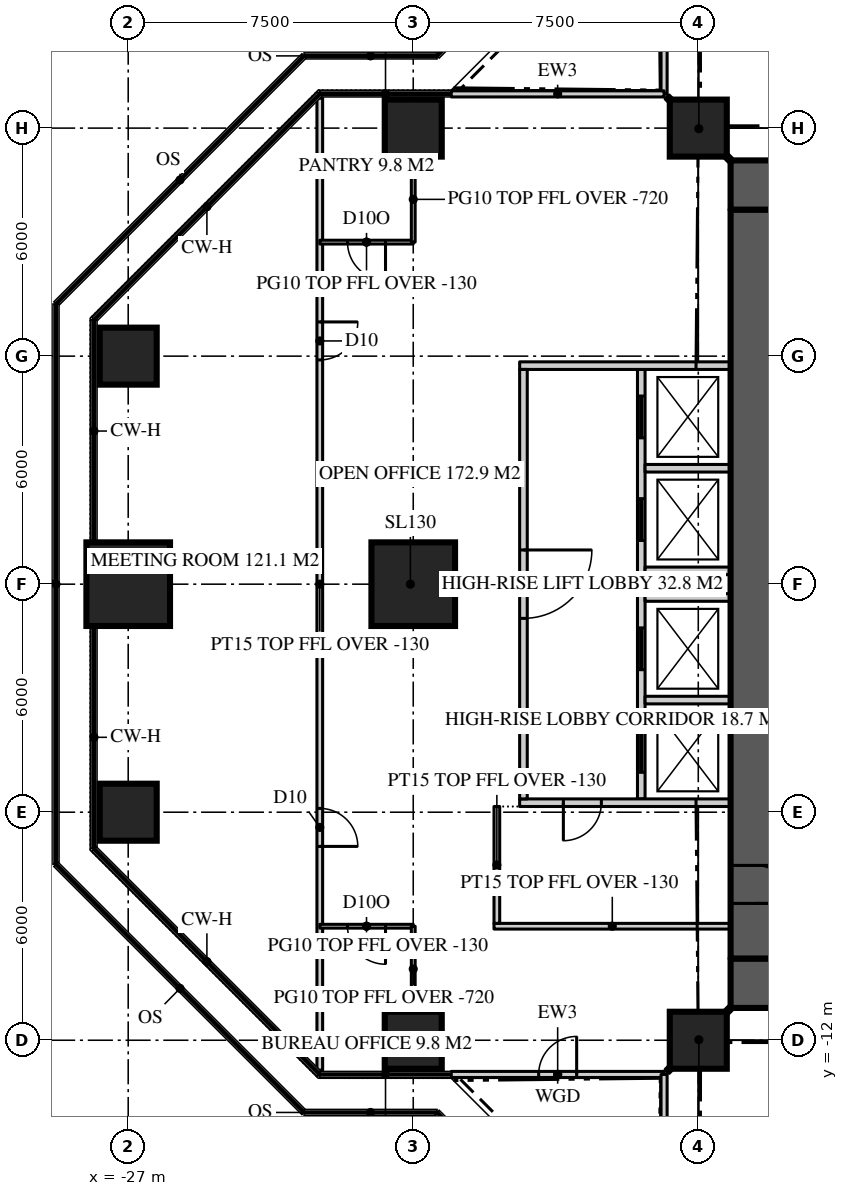
"""IFC4 building model, lengths in metres.
Left out: names, types, materials, properties, quantities, classifications, styles, units other than length and angle.
Written with IfcOpenShell. Run it as: python <this file> out.ifc"""

import sys

from ifc_helpers import new_model, si_unit, direction, frame, frame_2d, origin, origin_2d, place, context, subcontext, project, spatial, rectangle, extrude, element, fill, save


model = new_model("IFC4")
c1 = context("Model", 3, precision=1e-05, world=origin(), true_north=direction((0.0, 1.0)))
c2 = subcontext(c1, "Body", "Model", "MODEL_VIEW")
j1 = project(units=[si_unit("LENGTHUNIT", "METRE"), si_unit("PLANEANGLEUNIT", "RADIAN")], contexts=[c1])
p1 = place(None, origin())
s1 = spatial("IfcSite", under=j1, at=p1, CompositionType="ELEMENT")
p2 = place(p1, origin())
s2 = spatial("IfcBuilding", under=s1, at=p2, CompositionType="ELEMENT")
p3 = place(p2, frame((0.0, 0.0, 240.0)))
s3 = spatial("IfcBuildingStorey", under=s2, at=p3, CompositionType="ELEMENT", Elevation=240.0)
p4 = place(p3, frame((-11.15, 10.5, 0.0), z_axis=(0.0, 0.0, 1.0), x_axis=(1.0, 0.0, 0.0)))
e1 = element("IfcWall", 1, at=p4, inside=s3, PredefinedType="SHEAR", context=c2, shape_type="SweptSolid", body=[
    extrude(rectangle(XDim=22.3, YDim=1.3, at=frame_2d((11.15, 0.0))), origin(), (0.0, 0.0, 1.0), 3.9),
])
p5 = place(p4, frame((4.25, 0.0, 0.0)))
e2 = element("IfcOpeningElement", 2, at=p5, cuts=e1, PredefinedType="OPENING", context=c2, shape_type="SweptSolid", body=[
    extrude(rectangle(XDim=1.8, YDim=2.2, at=frame_2d((0.9, 1.1))), frame((0.0, 0.66, 0.0), z_axis=(0.0, -1.0, 0.0), x_axis=(1.0, 0.0, 0.0)), (0.0, 0.0, 1.0), 1.32),
])
p6 = place(p4, frame((16.25, 0.0, 0.0)))
e3 = element("IfcOpeningElement", 3, at=p6, cuts=e1, PredefinedType="OPENING", context=c2, shape_type="SweptSolid", body=[
    extrude(rectangle(XDim=1.8, YDim=2.2, at=frame_2d((0.9, 1.1))), frame((0.0, 0.66, 0.0), z_axis=(0.0, -1.0, 0.0), x_axis=(1.0, 0.0, 0.0)), (0.0, 0.0, 1.0), 1.32),
])
p7 = place(p3, frame((11.15, -10.5, 0.0), z_axis=(0.0, 0.0, 1.0), x_axis=(-1.0, 0.0, 0.0)))
e4 = element("IfcWall", 4, at=p7, inside=s3, PredefinedType="SHEAR", context=c2, shape_type="SweptSolid", body=[
    extrude(rectangle(XDim=22.3, YDim=1.3, at=frame_2d((11.15, 0.0))), origin(), (0.0, 0.0, 1.0), 3.9),
])
p8 = place(p7, frame((16.25, 0.0, 0.0)))
e5 = element("IfcOpeningElement", 5, at=p8, cuts=e4, PredefinedType="OPENING", context=c2, shape_type="SweptSolid", body=[
    extrude(rectangle(XDim=1.8, YDim=2.2, at=frame_2d((0.9, 1.1))), frame((0.0, 0.66, 0.0), z_axis=(0.0, -1.0, 0.0), x_axis=(1.0, 0.0, 0.0)), (0.0, 0.0, 1.0), 1.32),
])
p9 = place(p7, frame((4.25, 0.0, 0.0)))
e6 = element("IfcOpeningElement", 6, at=p9, cuts=e4, PredefinedType="OPENING", context=c2, shape_type="SweptSolid", body=[
    extrude(rectangle(XDim=1.8, YDim=2.2, at=frame_2d((0.9, 1.1))), frame((0.0, 0.66, 0.0), z_axis=(0.0, -1.0, 0.0), x_axis=(1.0, 0.0, 0.0)), (0.0, 0.0, 1.0), 1.32),
])
p10 = place(p3, frame((-10.5, 9.85, 0.0), z_axis=(0.0, 0.0, 1.0), x_axis=(0.0, -1.0, 0.0)))
e7 = element("IfcWall", 7, at=p10, inside=s3, PredefinedType="SHEAR", context=c2, shape_type="SweptSolid", body=[
    extrude(rectangle(XDim=19.7, YDim=1.3, at=frame_2d((9.85, 0.0))), origin(), (0.0, 0.0, 1.0), 3.9),
])
p11 = place(p10, frame((17.25, 0.0, 0.0)))
e8 = element("IfcOpeningElement", 8, at=p11, cuts=e7, PredefinedType="OPENING", context=c2, shape_type="SweptSolid", body=[
    extrude(rectangle(XDim=1.0, YDim=2.2, at=frame_2d((0.5, 1.1))), frame((0.0, 0.66, 0.0), z_axis=(0.0, -1.0, 0.0), x_axis=(1.0, 0.0, 0.0)), (0.0, 0.0, 1.0), 1.32),
])
for number, where, z_axis, x_axis in (
    (9, (-19.5, -12.0, 0.0), (0.0, 0.0, 1.0), (1.0, 0.0, 0.0)),
    (10, (-12.0, -12.0, 0.0), (0.0, 0.0, 1.0), (1.0, 0.0, 0.0)),
    (11, (-27.0, -6.0, 0.0), (0.0, 0.0, 1.0), (1.0, 0.0, 0.0)),
):
    element("IfcColumn", number, at=place(p3, frame(where, z_axis=z_axis, x_axis=x_axis)), inside=s3, PredefinedType="COLUMN", context=c2, shape_type="SweptSolid", body=[
        extrude(rectangle(XDim=1.5, YDim=1.5, at=origin_2d()), origin(), (0.0, 0.0, 1.0), 3.9),
    ])
for number, where, z_axis, x_axis in (
    (12, (-27.0, 0.0, 0.0), (0.0, 0.0, 1.0), (1.0, 0.0, 0.0)),
    (13, (-19.5, 0.0, 0.0), (0.0, 0.0, 1.0), (1.0, 0.0, 0.0)),
):
    element("IfcColumn", number, at=place(p3, frame(where, z_axis=z_axis, x_axis=x_axis)), inside=s3, PredefinedType="COLUMN", context=c2, shape_type="SweptSolid", body=[
        extrude(rectangle(XDim=2.2, YDim=2.2, at=origin_2d()), origin(), (0.0, 0.0, 1.0), 3.9),
    ])
for number, where, z_axis, x_axis in (
    (14, (-27.0, 6.0, 0.0), (0.0, 0.0, 1.0), (1.0, 0.0, 0.0)),
    (15, (-19.5, 12.0, 0.0), (0.0, 0.0, 1.0), (1.0, 0.0, 0.0)),
    (16, (-12.0, 12.0, 0.0), (0.0, 0.0, 1.0), (1.0, 0.0, 0.0)),
):
    element("IfcColumn", number, at=place(p3, frame(where, z_axis=z_axis, x_axis=x_axis)), inside=s3, PredefinedType="COLUMN", context=c2, shape_type="SweptSolid", body=[
        extrude(rectangle(XDim=1.5, YDim=1.5, at=origin_2d()), origin(), (0.0, 0.0, 1.0), 3.9),
    ])
p12 = place(p3, frame((-12.9, 18.5, 0.0), z_axis=(0.0, 0.0, 1.0), x_axis=(0.0, -1.0, 0.0)))
e17 = element("IfcWall", 17, at=p12, inside=s3, PredefinedType="SOLIDWALL", context=c2, shape_type="SweptSolid", body=[
    extrude(rectangle(XDim=5.6, YDim=0.16, at=frame_2d((2.8, 0.0))), origin(), (0.0, 0.0, 1.0), 3.77),
])
p13 = place(p12, frame((2.3, 0.0, 0.0)))
e18 = element("IfcOpeningElement", 18, at=p13, cuts=e17, PredefinedType="OPENING", context=c2, shape_type="SweptSolid", body=[
    extrude(rectangle(XDim=1.0, YDim=2.2, at=frame_2d((0.5, 1.1))), frame((0.0, 0.09, 0.0), z_axis=(0.0, -1.0, 0.0), x_axis=(1.0, 0.0, 0.0)), (0.0, 0.0, 1.0), 0.18),
])
p14 = place(p3, frame((-12.9, 12.9, 0.0), z_axis=(0.0, 0.0, 1.0), x_axis=(-1.0, 0.0, 0.0)))
e19 = element("IfcWall", 19, at=p14, inside=s3, PredefinedType="SOLIDWALL", context=c2, shape_type="SweptSolid", body=[
    extrude(rectangle(XDim=5.6, YDim=0.16, at=frame_2d((2.8, 0.0))), origin(), (0.0, 0.0, 1.0), 3.77),
])
p15 = place(p3, frame((-18.5, -12.9, 0.0), z_axis=(0.0, 0.0, 1.0), x_axis=(1.0, 0.0, 0.0)))
e20 = element("IfcWall", 20, at=p15, inside=s3, PredefinedType="SOLIDWALL", context=c2, shape_type="SweptSolid", body=[
    extrude(rectangle(XDim=5.6, YDim=0.16, at=frame_2d((2.8, 0.0))), origin(), (0.0, 0.0, 1.0), 3.77),
])
p16 = place(p15, frame((2.3, 0.0, 0.0)))
e21 = element("IfcOpeningElement", 21, at=p16, cuts=e20, PredefinedType="OPENING", context=c2, shape_type="SweptSolid", body=[
    extrude(rectangle(XDim=1.0, YDim=2.2, at=frame_2d((0.5, 1.1))), frame((0.0, 0.09, 0.0), z_axis=(0.0, -1.0, 0.0), x_axis=(1.0, 0.0, 0.0)), (0.0, 0.0, 1.0), 0.18),
])
p17 = place(p3, frame((-12.9, -12.9, 0.0), z_axis=(0.0, 0.0, 1.0), x_axis=(0.0, -1.0, 0.0)))
e22 = element("IfcWall", 22, at=p17, inside=s3, PredefinedType="SOLIDWALL", context=c2, shape_type="SweptSolid", body=[
    extrude(rectangle(XDim=5.6, YDim=0.16, at=frame_2d((2.8, 0.0))), origin(), (0.0, 0.0, 1.0), 3.77),
])
p18 = place(p3, frame((-21.959, 12.786, 0.0), z_axis=(0.0, 0.0, 1.0), x_axis=(0.0, -1.0, 0.0)))
e23 = element("IfcWall", 23, at=p18, inside=s3, PredefinedType="PARTITIONING", context=c2, shape_type="SweptSolid", body=[
    extrude(rectangle(XDim=25.573, YDim=0.15, at=frame_2d((12.786, 0.0))), origin(), (0.0, 0.0, 1.0), 3.77),
])
p19 = place(p18, frame((18.687, 0.0, 0.0)))
e24 = element("IfcOpeningElement", 24, at=p19, cuts=e23, PredefinedType="OPENING", context=c2, shape_type="SweptSolid", body=[
    extrude(rectangle(XDim=1.0, YDim=2.2, at=frame_2d((0.5, 1.1))), frame((0.0, 0.085, 0.0), z_axis=(0.0, -1.0, 0.0), x_axis=(1.0, 0.0, 0.0)), (0.0, 0.0, 1.0), 0.17),
])
p20 = place(p18, frame((5.886, 0.0, 0.0)))
e25 = element("IfcOpeningElement", 25, at=p20, cuts=e23, PredefinedType="OPENING", context=c2, shape_type="SweptSolid", body=[
    extrude(rectangle(XDim=1.0, YDim=2.2, at=frame_2d((0.5, 1.1))), frame((0.0, 0.085, 0.0), z_axis=(0.0, -1.0, 0.0), x_axis=(1.0, 0.0, 0.0)), (0.0, 0.0, 1.0), 0.17),
])
p21 = place(p3, frame((-19.5, -9.0, 0.0), z_axis=(0.0, 0.0, 1.0), x_axis=(-1.0, 0.0, 0.0)))
e26 = element("IfcWall", 26, at=p21, inside=s3, PredefinedType="PARTITIONING", context=c2, shape_type="SweptSolid", body=[
    extrude(rectangle(XDim=2.459, YDim=0.1, at=frame_2d((1.229, 0.0))), origin(), (0.0, 0.0, 1.0), 3.77),
])
p22 = place(p21, frame((0.729, 0.0, 0.0)))
e27 = element("IfcOpeningElement", 27, at=p22, cuts=e26, PredefinedType="OPENING", context=c2, shape_type="SweptSolid", body=[
    extrude(rectangle(XDim=1.0, YDim=2.2, at=frame_2d((0.5, 1.1))), frame((0.0, 0.06, 0.0), z_axis=(0.0, -1.0, 0.0), x_axis=(1.0, 0.0, 0.0)), (0.0, 0.0, 1.0), 0.12),
])
p23 = place(p3, frame((-19.5, -9.0, 0.0), z_axis=(0.0, 0.0, 1.0), x_axis=(0.0, -1.0, 0.0)))
e28 = element("IfcWall", 28, at=p23, inside=s3, PredefinedType="PARTITIONING", context=c2, shape_type="SweptSolid", body=[
    extrude(rectangle(XDim=2.25, YDim=0.1, at=frame_2d((1.125, 0.0))), origin(), (0.0, 0.0, 1.0), 3.18),
])
p24 = place(p3, frame((-19.5, 9.0, 0.0), z_axis=(0.0, 0.0, 1.0), x_axis=(-1.0, 0.0, 0.0)))
e29 = element("IfcWall", 29, at=p24, inside=s3, PredefinedType="PARTITIONING", context=c2, shape_type="SweptSolid", body=[
    extrude(rectangle(XDim=2.459, YDim=0.1, at=frame_2d((1.229, 0.0))), origin(), (0.0, 0.0, 1.0), 3.77),
])
p25 = place(p24, frame((0.729, 0.0, 0.0)))
e30 = element("IfcOpeningElement", 30, at=p25, cuts=e29, PredefinedType="OPENING", context=c2, shape_type="SweptSolid", body=[
    extrude(rectangle(XDim=1.0, YDim=2.2, at=frame_2d((0.5, 1.1))), frame((0.0, 0.06, 0.0), z_axis=(0.0, -1.0, 0.0), x_axis=(1.0, 0.0, 0.0)), (0.0, 0.0, 1.0), 0.12),
])
p26 = place(p3, frame((-19.5, 9.0, 0.0), z_axis=(0.0, 0.0, 1.0), x_axis=(0.0, 1.0, 0.0)))
e31 = element("IfcWall", 31, at=p26, inside=s3, PredefinedType="PARTITIONING", context=c2, shape_type="SweptSolid", body=[
    extrude(rectangle(XDim=2.25, YDim=0.1, at=frame_2d((1.125, 0.0))), origin(), (0.0, 0.0, 1.0), 3.18),
])
p27 = place(p3, frame((-13.5, 5.65, 0.0), z_axis=(0.0, 0.0, 1.0), x_axis=(0.0, -1.0, 0.0)))
e32 = element("IfcWall", 32, at=p27, inside=s3, PredefinedType="SOLIDWALL", context=c2, shape_type="SweptSolid", body=[
    extrude(rectangle(XDim=11.3, YDim=0.2, at=frame_2d((5.65, 0.0))), origin(), (0.0, 0.0, 1.0), 3.7),
])
p28 = place(p27, frame((0.7, 0.0, 0.0)))
e33 = element("IfcOpeningElement", 33, at=p28, cuts=e32, PredefinedType="OPENING", context=c2, shape_type="SweptSolid", body=[
    extrude(rectangle(XDim=1.1, YDim=2.2, at=frame_2d((0.55, 1.1))), frame((0.0, 0.11, 0.0), z_axis=(0.0, -1.0, 0.0), x_axis=(1.0, 0.0, 0.0)), (0.0, 0.0, 1.0), 0.22),
])
p29 = place(p27, frame((3.4, 0.0, 0.0)))
e34 = element("IfcOpeningElement", 34, at=p29, cuts=e32, PredefinedType="OPENING", context=c2, shape_type="SweptSolid", body=[
    extrude(rectangle(XDim=1.1, YDim=2.2, at=frame_2d((0.55, 1.1))), frame((0.0, 0.11, 0.0), z_axis=(0.0, -1.0, 0.0), x_axis=(1.0, 0.0, 0.0)), (0.0, 0.0, 1.0), 0.22),
])
p30 = place(p27, frame((6.8, 0.0, 0.0)))
e35 = element("IfcOpeningElement", 35, at=p30, cuts=e32, PredefinedType="OPENING", context=c2, shape_type="SweptSolid", body=[
    extrude(rectangle(XDim=1.1, YDim=2.2, at=frame_2d((0.55, 1.1))), frame((0.0, 0.11, 0.0), z_axis=(0.0, -1.0, 0.0), x_axis=(1.0, 0.0, 0.0)), (0.0, 0.0, 1.0), 0.22),
])
p31 = place(p27, frame((9.5, 0.0, 0.0)))
e36 = element("IfcOpeningElement", 36, at=p31, cuts=e32, PredefinedType="OPENING", context=c2, shape_type="SweptSolid", body=[
    extrude(rectangle(XDim=1.1, YDim=2.2, at=frame_2d((0.55, 1.1))), frame((0.0, 0.11, 0.0), z_axis=(0.0, -1.0, 0.0), x_axis=(1.0, 0.0, 0.0)), (0.0, 0.0, 1.0), 0.22),
])
p32 = place(p3, frame((-11.15, 5.75, 0.0), z_axis=(0.0, 0.0, 1.0), x_axis=(-1.0, 0.0, 0.0)))
e37 = element("IfcWall", 37, at=p32, inside=s3, PredefinedType="SOLIDWALL", context=c2, shape_type="SweptSolid", body=[
    extrude(rectangle(XDim=5.55, YDim=0.2, at=frame_2d((2.775, 0.0))), origin(), (0.0, 0.0, 1.0), 3.7),
])
p33 = place(p3, frame((-11.15, -5.75, 0.0), z_axis=(0.0, 0.0, 1.0), x_axis=(-1.0, 0.0, 0.0)))
e38 = element("IfcWall", 38, at=p33, inside=s3, PredefinedType="SOLIDWALL", context=c2, shape_type="SweptSolid", body=[
    extrude(rectangle(XDim=5.55, YDim=0.2, at=frame_2d((2.775, 0.0))), origin(), (0.0, 0.0, 1.0), 3.7),
])
p34 = place(p33, frame((3.4, 0.0, 0.0)))
e39 = element("IfcOpeningElement", 39, at=p34, cuts=e38, PredefinedType="OPENING", context=c2, shape_type="SweptSolid", body=[
    extrude(rectangle(XDim=1.0, YDim=2.2, at=frame_2d((0.5, 1.1))), frame((0.0, 0.11, 0.0), z_axis=(0.0, -1.0, 0.0), x_axis=(1.0, 0.0, 0.0)), (0.0, 0.0, 1.0), 0.22),
])
for number, where, z_axis, x_axis in (
    (40, (-11.15, 3.05, 0.0), (0.0, 0.0, 1.0), (-1.0, 0.0, 0.0)),
    (41, (-11.15, 0.35, 0.0), (0.0, 0.0, 1.0), (-1.0, 0.0, 0.0)),
    (42, (-11.15, -0.35, 0.0), (0.0, 0.0, 1.0), (-1.0, 0.0, 0.0)),
    (43, (-11.15, -3.05, 0.0), (0.0, 0.0, 1.0), (-1.0, 0.0, 0.0)),
):
    element("IfcWall", number, at=place(p3, frame(where, z_axis=z_axis, x_axis=x_axis)), inside=s3, PredefinedType="SOLIDWALL", context=c2, shape_type="SweptSolid", body=[
        extrude(rectangle(XDim=2.25, YDim=0.2, at=frame_2d((1.125, 0.0))), origin(), (0.0, 0.0, 1.0), 3.7),
    ])
p35 = place(p3, frame((-16.6, 5.65, 0.0), z_axis=(0.0, 0.0, 1.0), x_axis=(0.0, -1.0, 0.0)))
e44 = element("IfcWall", 44, at=p35, inside=s3, PredefinedType="SOLIDWALL", context=c2, shape_type="SweptSolid", body=[
    extrude(rectangle(XDim=11.3, YDim=0.2, at=frame_2d((5.65, 0.0))), origin(), (0.0, 0.0, 1.0), 3.18),
])
p36 = place(p35, frame((4.75, 0.0, 0.0)))
e45 = element("IfcOpeningElement", 45, at=p36, cuts=e44, PredefinedType="OPENING", context=c2, shape_type="SweptSolid", body=[
    extrude(rectangle(XDim=1.8, YDim=2.2, at=frame_2d((0.9, 1.1))), frame((0.0, 0.11, 0.0), z_axis=(0.0, -1.0, 0.0), x_axis=(1.0, 0.0, 0.0)), (0.0, 0.0, 1.0), 0.22),
])
for number, where, z_axis, x_axis in (
    (46, (-11.15, 11.15, 0.0), (0.0, 0.0, 1.0), (-0.707, 0.707, 0.0)),
    (47, (-11.15, -11.15, 0.0), (0.0, 0.0, 1.0), (-0.707, -0.707, 0.0)),
):
    element("IfcWall", number, at=place(p3, frame(where, z_axis=z_axis, x_axis=x_axis)), inside=s3, PredefinedType="PARTITIONING", context=c2, shape_type="SweptSolid", body=[
        extrude(rectangle(XDim=2.362, YDim=0.15, at=frame_2d((1.181, 0.0))), origin(), (0.0, 0.0, 1.0), 3.22),
    ])
p37 = place(p3, frame((-11.15, -9.0, 0.0), z_axis=(0.0, 0.0, 1.0), x_axis=(-1.0, 0.0, 0.0)))
e48 = element("IfcWall", 48, at=p37, inside=s3, PredefinedType="PARTITIONING", context=c2, shape_type="SweptSolid", body=[
    extrude(rectangle(XDim=6.225, YDim=0.15, at=frame_2d((3.113, 0.0))), origin(), (0.0, 0.0, 1.0), 3.77),
])
p38 = place(p3, frame((-17.3, -5.85, 0.0), z_axis=(0.0, 0.0, 1.0), x_axis=(0.0, -1.0, 0.0)))
e49 = element("IfcWall", 49, at=p38, inside=s3, PredefinedType="PARTITIONING", context=c2, shape_type="SweptSolid", body=[
    extrude(rectangle(XDim=3.075, YDim=0.15, at=frame_2d((1.538, 0.0))), origin(), (0.0, 0.0, 1.0), 3.77),
])
p39 = place(p16, origin())
e50 = element("IfcDoor", 50, at=p39, inside=s3, OperationType="SINGLE_SWING_RIGHT", PredefinedType="DOOR", context=c2, shape_type="SweptSolid", body=[
    extrude(rectangle(XDim=1.0, YDim=2.2, at=frame_2d((0.5, 1.1))), frame((0.0, 0.025, 0.0), z_axis=(0.0, -1.0, 0.0), x_axis=(1.0, 0.0, 0.0)), (0.0, 0.0, 1.0), 0.05),
])
fill(e21, e50)
p40 = place(p11, origin())
e51 = element("IfcDoor", 51, at=p40, inside=s3, OperationType="SINGLE_SWING_RIGHT", PredefinedType="DOOR", context=c2, shape_type="SweptSolid", body=[
    extrude(rectangle(XDim=1.0, YDim=2.2, at=frame_2d((0.5, 1.1))), frame((0.0, 0.025, 0.0), z_axis=(0.0, -1.0, 0.0), x_axis=(1.0, 0.0, 0.0)), (0.0, 0.0, 1.0), 0.05),
])
fill(e8, e51)
p41 = place(p19, origin())
e52 = element("IfcDoor", 52, at=p41, inside=s3, OperationType="SINGLE_SWING_RIGHT", PredefinedType="DOOR", context=c2, shape_type="SweptSolid", body=[
    extrude(rectangle(XDim=1.0, YDim=2.2, at=frame_2d((0.5, 1.1))), frame((0.0, 0.025, 0.0), z_axis=(0.0, -1.0, 0.0), x_axis=(1.0, 0.0, 0.0)), (0.0, 0.0, 1.0), 0.05),
])
fill(e24, e52)
p42 = place(p20, origin())
e53 = element("IfcDoor", 53, at=p42, inside=s3, OperationType="SINGLE_SWING_LEFT", PredefinedType="DOOR", context=c2, shape_type="SweptSolid", body=[
    extrude(rectangle(XDim=1.0, YDim=2.2, at=frame_2d((0.5, 1.1))), frame((0.0, 0.025, 0.0), z_axis=(0.0, -1.0, 0.0), x_axis=(1.0, 0.0, 0.0)), (0.0, 0.0, 1.0), 0.05),
])
fill(e25, e53)
p43 = place(p22, origin())
e54 = element("IfcDoor", 54, at=p43, inside=s3, OperationType="SINGLE_SWING_LEFT", PredefinedType="DOOR", context=c2, shape_type="SweptSolid", body=[
    extrude(rectangle(XDim=1.0, YDim=2.2, at=frame_2d((0.5, 1.1))), frame((0.0, 0.025, 0.0), z_axis=(0.0, -1.0, 0.0), x_axis=(1.0, 0.0, 0.0)), (0.0, 0.0, 1.0), 0.05),
])
fill(e27, e54)
p44 = place(p25, origin())
e55 = element("IfcDoor", 55, at=p44, inside=s3, OperationType="SINGLE_SWING_LEFT", PredefinedType="DOOR", context=c2, shape_type="SweptSolid", body=[
    extrude(rectangle(XDim=1.0, YDim=2.2, at=frame_2d((0.5, 1.1))), frame((0.0, 0.025, 0.0), z_axis=(0.0, -1.0, 0.0), x_axis=(1.0, 0.0, 0.0)), (0.0, 0.0, 1.0), 0.05),
])
fill(e30, e55)
p45 = place(p36, origin())
e56 = element("IfcDoor", 56, at=p45, inside=s3, OperationType="DOUBLE_DOOR_DOUBLE_SWING", PredefinedType="DOOR", context=c2, shape_type="SweptSolid", body=[
    extrude(rectangle(XDim=1.8, YDim=2.2, at=frame_2d((0.9, 1.1))), frame((0.0, 0.025, 0.0), z_axis=(0.0, -1.0, 0.0), x_axis=(1.0, 0.0, 0.0)), (0.0, 0.0, 1.0), 0.05),
])
fill(e45, e56)
p46 = place(p28, origin())
e57 = element("IfcDoor", 57, at=p46, inside=s3, OperationType="SLIDING_TO_LEFT", PredefinedType="DOOR", context=c2, shape_type="SweptSolid", body=[
    extrude(rectangle(XDim=1.1, YDim=2.2, at=frame_2d((0.55, 1.1))), frame((0.0, 0.025, 0.0), z_axis=(0.0, -1.0, 0.0), x_axis=(1.0, 0.0, 0.0)), (0.0, 0.0, 1.0), 0.05),
])
fill(e33, e57)
p47 = place(p29, origin())
e58 = element("IfcDoor", 58, at=p47, inside=s3, OperationType="SLIDING_TO_LEFT", PredefinedType="DOOR", context=c2, shape_type="SweptSolid", body=[
    extrude(rectangle(XDim=1.1, YDim=2.2, at=frame_2d((0.55, 1.1))), frame((0.0, 0.025, 0.0), z_axis=(0.0, -1.0, 0.0), x_axis=(1.0, 0.0, 0.0)), (0.0, 0.0, 1.0), 0.05),
])
fill(e34, e58)
p48 = place(p30, origin())
e59 = element("IfcDoor", 59, at=p48, inside=s3, OperationType="SLIDING_TO_LEFT", PredefinedType="DOOR", context=c2, shape_type="SweptSolid", body=[
    extrude(rectangle(XDim=1.1, YDim=2.2, at=frame_2d((0.55, 1.1))), frame((0.0, 0.025, 0.0), z_axis=(0.0, -1.0, 0.0), x_axis=(1.0, 0.0, 0.0)), (0.0, 0.0, 1.0), 0.05),
])
fill(e35, e59)
p49 = place(p31, origin())
e60 = element("IfcDoor", 60, at=p49, inside=s3, OperationType="SLIDING_TO_LEFT", PredefinedType="DOOR", context=c2, shape_type="SweptSolid", body=[
    extrude(rectangle(XDim=1.1, YDim=2.2, at=frame_2d((0.55, 1.1))), frame((0.0, 0.025, 0.0), z_axis=(0.0, -1.0, 0.0), x_axis=(1.0, 0.0, 0.0)), (0.0, 0.0, 1.0), 0.05),
])
fill(e36, e60)
p50 = place(p34, origin())
e61 = element("IfcDoor", 61, at=p50, inside=s3, OperationType="SINGLE_SWING_RIGHT", PredefinedType="DOOR", context=c2, shape_type="SweptSolid", body=[
    extrude(rectangle(XDim=1.0, YDim=2.2, at=frame_2d((0.5, 1.1))), frame((0.0, 0.025, 0.0), z_axis=(0.0, -1.0, 0.0), x_axis=(1.0, 0.0, 0.0)), (0.0, 0.0, 1.0), 0.05),
])
fill(e39, e61)
save(model, sys.argv[1])
